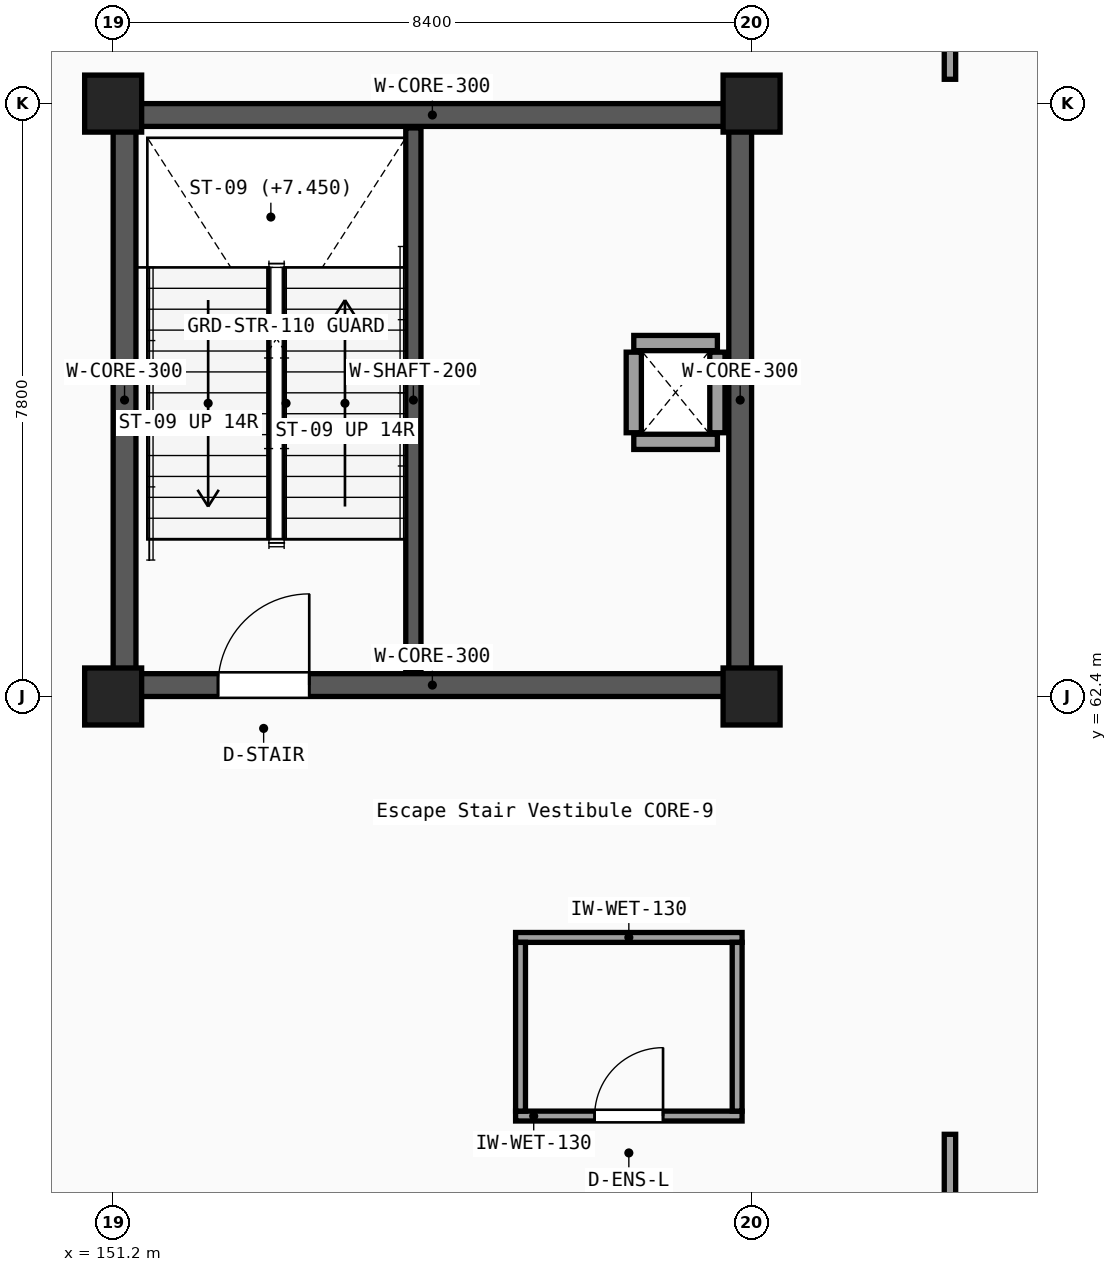
"""IFC4 building model, lengths in metres.
Left out: names, types, materials, properties, quantities, classifications, styles, units other than length and angle.
Written with IfcOpenShell. Run it as: python <this file> out.ifc"""

import sys

from ifc_helpers import new_model, si_unit, direction, frame, frame_2d, origin, origin_2d, place, context, subcontext, project, spatial, rectangle, extrude, element, fill, save


model = new_model("IFC4")
c1 = context("Model", 3, precision=1e-05, world=origin(), true_north=direction((0.0, 1.0)))
c2 = subcontext(c1, "Body", "Model", "MODEL_VIEW")
j1 = project(units=[si_unit("LENGTHUNIT", "METRE"), si_unit("PLANEANGLEUNIT", "RADIAN")], contexts=[c1])
p1 = place(None, origin())
s1 = spatial("IfcSite", under=j1, at=p1, CompositionType="ELEMENT")
p2 = place(p1, origin())
s2 = spatial("IfcBuilding", under=s1, at=p2, CompositionType="ELEMENT")
p3 = place(p2, frame((0.0, 0.0, 5.1)))
s3 = spatial("IfcBuildingStorey", under=s2, at=p3, CompositionType="ELEMENT", Elevation=5.1)
for number, where, z_axis, x_axis in (
    (1, (151.2, 62.4, 0.0), (0.0, 0.0, 1.0), (1.0, 0.0, 0.0)),
    (2, (151.2, 70.2, 0.0), (0.0, 0.0, 1.0), (1.0, 0.0, 0.0)),
    (3, (159.6, 62.4, 0.0), (0.0, 0.0, 1.0), (1.0, 0.0, 0.0)),
    (4, (159.6, 70.2, 0.0), (0.0, 0.0, 1.0), (1.0, 0.0, 0.0)),
):
    element("IfcColumn", number, at=place(p3, frame(where, z_axis=z_axis, x_axis=x_axis)), inside=s3, PredefinedType="COLUMN", context=c2, shape_type="SweptSolid", body=[
        extrude(rectangle(XDim=0.75, YDim=0.75, at=origin_2d()), origin(), (0.0, 0.0, 1.0), 5.1),
    ])
p4 = place(p3, frame((151.2, 62.55, 0.0), z_axis=(0.0, 0.0, 1.0), x_axis=(1.0, 0.0, 0.0)))
e5 = element("IfcWall", 5, at=p4, inside=s3, PredefinedType="SHEAR", context=c2, shape_type="SweptSolid", body=[
    extrude(rectangle(XDim=8.4, YDim=0.3, at=frame_2d((4.2, 0.0))), origin(), (0.0, 0.0, 1.0), 4.85),
])
p5 = place(p4, frame((1.38, 0.0, 0.0)))
e6 = element("IfcOpeningElement", 6, at=p5, cuts=e5, PredefinedType="OPENING", context=c2, shape_type="SweptSolid", body=[
    extrude(rectangle(XDim=1.2, YDim=2.15, at=frame_2d((0.6, 1.075))), frame((0.0, 0.16, 0.0), z_axis=(0.0, -1.0, 0.0), x_axis=(1.0, 0.0, 0.0)), (0.0, 0.0, 1.0), 0.32),
])
p6 = place(p3, frame((151.2, 70.05, 0.0), z_axis=(0.0, 0.0, 1.0), x_axis=(1.0, 0.0, 0.0)))
e7 = element("IfcWall", 7, at=p6, inside=s3, PredefinedType="SHEAR", context=c2, shape_type="SweptSolid", body=[
    extrude(rectangle(XDim=8.4, YDim=0.3, at=frame_2d((4.2, 0.0))), origin(), (0.0, 0.0, 1.0), 4.85),
])
for number, where, z_axis, x_axis in (
    (8, (151.35, 62.7, 0.0), (0.0, 0.0, 1.0), (0.0, 1.0, 0.0)),
    (9, (159.45, 62.7, 0.0), (0.0, 0.0, 1.0), (0.0, 1.0, 0.0)),
):
    element("IfcWall", number, at=place(p3, frame(where, z_axis=z_axis, x_axis=x_axis)), inside=s3, PredefinedType="SHEAR", context=c2, shape_type="SweptSolid", body=[
        extrude(rectangle(XDim=7.2, YDim=0.3, at=frame_2d((3.6, 0.0))), origin(), (0.0, 0.0, 1.0), 4.85),
    ])
p7 = place(p3, frame((155.15, 62.72, 0.0), z_axis=(0.0, 0.0, 1.0), x_axis=(0.0, 1.0, 0.0)))
e10 = element("IfcWall", 10, at=p7, inside=s3, PredefinedType="SHEAR", context=c2, shape_type="SweptSolid", body=[
    extrude(rectangle(XDim=7.16, YDim=0.2, at=frame_2d((3.58, 0.0))), origin(), (0.0, 0.0, 1.0), 4.85),
])
for number, where, z_axis, x_axis in (
    (11, (158.05, 65.75, 0.0), (0.0, 0.0, 1.0), (1.0, 0.0, 0.0)),
    (12, (158.05, 67.05, 0.0), (0.0, 0.0, 1.0), (1.0, 0.0, 0.0)),
):
    element("IfcWall", number, at=place(p3, frame(where, z_axis=z_axis, x_axis=x_axis)), inside=s3, PredefinedType="PARTITIONING", context=c2, shape_type="SweptSolid", body=[
        extrude(rectangle(XDim=1.1, YDim=0.2, at=frame_2d((0.55, 0.0))), origin(), (0.0, 0.0, 1.0), 4.33),
    ])
for number, where, z_axis, x_axis in (
    (13, (158.05, 65.87, 0.0), (0.0, 0.0, 1.0), (0.0, 1.0, 0.0)),
    (14, (159.15, 65.87, 0.0), (0.0, 0.0, 1.0), (0.0, 1.0, 0.0)),
):
    element("IfcWall", number, at=place(p3, frame(where, z_axis=z_axis, x_axis=x_axis)), inside=s3, PredefinedType="PARTITIONING", context=c2, shape_type="SweptSolid", body=[
        extrude(rectangle(XDim=1.06, YDim=0.2, at=frame_2d((0.53, 0.0))), origin(), (0.0, 0.0, 1.0), 4.33),
    ])
p8 = place(p3, frame((162.21, 47.42, 0.0), z_axis=(0.0, 0.0, 1.0), x_axis=(0.0, 1.0, 0.0)))
e15 = element("IfcWall", 15, at=p8, inside=s3, PredefinedType="PARTITIONING", context=c2, shape_type="SweptSolid", body=[
    extrude(rectangle(XDim=9.22, YDim=0.15, at=frame_2d((4.61, 0.0))), origin(), (0.0, 0.0, 1.0), 4.33),
])
p9 = place(p8, frame((4.085, 0.0, 0.0)))
e16 = element("IfcOpeningElement", 16, at=p9, cuts=e15, PredefinedType="OPENING", context=c2, shape_type="SweptSolid", body=[
    extrude(rectangle(XDim=1.05, YDim=2.15, at=frame_2d((0.525, 1.075))), frame((0.0, 0.085, 0.0), z_axis=(0.0, -1.0, 0.0), x_axis=(1.0, 0.0, 0.0)), (0.0, 0.0, 1.0), 0.17),
])
p10 = place(p3, frame((156.495, 56.88, 0.0), z_axis=(0.0, 0.0, 1.0), x_axis=(1.0, 0.0, 0.0)))
e17 = element("IfcWall", 17, at=p10, inside=s3, PredefinedType="PARTITIONING", context=c2, shape_type="SweptSolid", body=[
    extrude(rectangle(XDim=2.98, YDim=0.13, at=frame_2d((1.49, 0.0))), origin(), (0.0, 0.0, 1.0), 4.38),
])
p11 = place(p10, frame((1.04, 0.0, 0.0)))
e18 = element("IfcOpeningElement", 18, at=p11, cuts=e17, PredefinedType="OPENING", context=c2, shape_type="SweptSolid", body=[
    extrude(rectangle(XDim=0.9, YDim=2.1, at=frame_2d((0.45, 1.05))), frame((0.0, 0.075, 0.0), z_axis=(0.0, -1.0, 0.0), x_axis=(1.0, 0.0, 0.0)), (0.0, 0.0, 1.0), 0.15),
])
p12 = place(p3, frame((156.495, 59.23, 0.0), z_axis=(0.0, 0.0, 1.0), x_axis=(1.0, 0.0, 0.0)))
e19 = element("IfcWall", 19, at=p12, inside=s3, PredefinedType="PARTITIONING", context=c2, shape_type="SweptSolid", body=[
    extrude(rectangle(XDim=2.98, YDim=0.13, at=frame_2d((1.49, 0.0))), origin(), (0.0, 0.0, 1.0), 4.38),
])
p13 = place(p3, frame((156.56, 56.945, 0.0), z_axis=(0.0, 0.0, 1.0), x_axis=(0.0, 1.0, 0.0)))
e20 = element("IfcWall", 20, at=p13, inside=s3, PredefinedType="PARTITIONING", context=c2, shape_type="SweptSolid", body=[
    extrude(rectangle(XDim=2.22, YDim=0.13, at=frame_2d((1.11, 0.0))), origin(), (0.0, 0.0, 1.0), 4.82),
])
p14 = place(p3, frame((159.41, 56.945, 0.0), z_axis=(0.0, 0.0, 1.0), x_axis=(0.0, 1.0, 0.0)))
e21 = element("IfcWall", 21, at=p14, inside=s3, PredefinedType="PARTITIONING", context=c2, shape_type="SweptSolid", body=[
    extrude(rectangle(XDim=2.22, YDim=0.13, at=frame_2d((1.11, 0.0))), origin(), (0.0, 0.0, 1.0), 4.38),
])
p15 = place(p3, frame((162.21, 70.52, 0.0), z_axis=(0.0, 0.0, 1.0), x_axis=(0.0, 1.0, 0.0)))
e22 = element("IfcWall", 22, at=p15, inside=s3, PredefinedType="PARTITIONING", context=c2, shape_type="SweptSolid", body=[
    extrude(rectangle(XDim=11.07, YDim=0.15, at=frame_2d((5.535, 0.0))), origin(), (0.0, 0.0, 1.0), 4.33),
])
p16 = place(p15, frame((4.685, 0.0, 0.0)))
e23 = element("IfcOpeningElement", 23, at=p16, cuts=e22, PredefinedType="OPENING", context=c2, shape_type="SweptSolid", body=[
    extrude(rectangle(XDim=1.7, YDim=2.3, at=frame_2d((0.85, 1.15))), frame((0.0, 0.085, 0.0), z_axis=(0.0, -1.0, 0.0), x_axis=(1.0, 0.0, 0.0)), (0.0, 0.0, 1.0), 0.17),
])
p17 = place(p5, origin())
e24 = element("IfcDoor", 24, at=p17, inside=s3, OperationType="SINGLE_SWING_RIGHT", PredefinedType="DOOR", context=c2, shape_type="SweptSolid", body=[
    extrude(rectangle(XDim=1.2, YDim=2.15, at=frame_2d((0.6, 1.075))), frame((0.0, 0.025, 0.0), z_axis=(0.0, -1.0, 0.0), x_axis=(1.0, 0.0, 0.0)), (0.0, 0.0, 1.0), 0.05),
])
fill(e6, e24)
p18 = place(p11, origin())
e25 = element("IfcDoor", 25, at=p18, inside=s3, OperationType="SINGLE_SWING_RIGHT", PredefinedType="DOOR", context=c2, shape_type="SweptSolid", body=[
    extrude(rectangle(XDim=0.9, YDim=2.1, at=frame_2d((0.45, 1.05))), frame((0.0, 0.025, 0.0), z_axis=(0.0, -1.0, 0.0), x_axis=(1.0, 0.0, 0.0)), (0.0, 0.0, 1.0), 0.05),
])
fill(e18, e25)
save(model, sys.argv[1])
